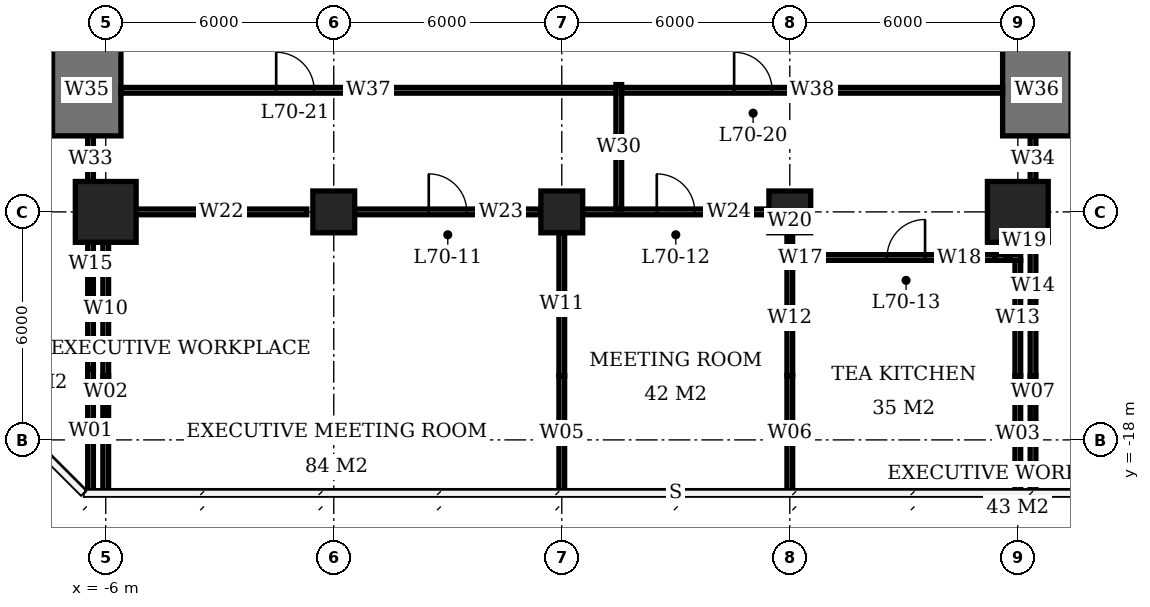
"""IFC4 building model, lengths in metres.
Left out: names, types, materials, properties, quantities, classifications, styles, units other than length and angle.
Written with IfcOpenShell. Run it as: python <this file> out.ifc"""

import sys

from ifc_helpers import new_model, si_unit, direction, frame, frame_2d, origin, origin_2d, place, context, subcontext, project, spatial, rectangle, extrude, element, fill, save


model = new_model("IFC4")
c1 = context("Model", 3, precision=1e-05, world=origin(), true_north=direction((0.0, 1.0)))
c2 = subcontext(c1, "Body", "Model", "MODEL_VIEW")
j1 = project(units=[si_unit("LENGTHUNIT", "METRE"), si_unit("PLANEANGLEUNIT", "RADIAN")], contexts=[c1])
p1 = place(None, origin())
s1 = spatial("IfcSite", under=j1, at=p1, CompositionType="ELEMENT")
p2 = place(p1, origin())
s2 = spatial("IfcBuilding", under=s1, at=p2, CompositionType="ELEMENT")
p3 = place(p2, frame((0.0, 0.0, 284.0)))
s3 = spatial("IfcBuildingStorey", under=s2, at=p3, CompositionType="ELEMENT", Elevation=284.0)
p4 = place(p3, frame((-6.0, -12.0, 0.0), z_axis=(0.0, 0.0, 1.0), x_axis=(1.0, 0.0, 0.0)))
e1 = element("IfcColumn", 1, at=p4, inside=s3, PredefinedType="COLUMN", context=c2, shape_type="SweptSolid", body=[
    extrude(rectangle(XDim=1.6, YDim=1.6, at=origin_2d()), origin(), (0.0, 0.0, 1.0), 3.9),
])
for number, where, z_axis, x_axis in (
    (2, (0.0, -12.0, 0.0), (0.0, 0.0, 1.0), (1.0, 0.0, 0.0)),
    (3, (6.0, -12.0, 0.0), (0.0, 0.0, 1.0), (1.0, 0.0, 0.0)),
    (4, (12.0, -12.0, 0.0), (0.0, 0.0, 1.0), (1.0, 0.0, 0.0)),
):
    element("IfcColumn", number, at=place(p3, frame(where, z_axis=z_axis, x_axis=x_axis)), inside=s3, PredefinedType="COLUMN", context=c2, shape_type="SweptSolid", body=[
        extrude(rectangle(XDim=1.1, YDim=1.1, at=origin_2d()), origin(), (0.0, 0.0, 1.0), 3.9),
    ])
p5 = place(p3, frame((18.0, -12.0, 0.0), z_axis=(0.0, 0.0, 1.0), x_axis=(1.0, 0.0, 0.0)))
e5 = element("IfcColumn", 5, at=p5, inside=s3, PredefinedType="COLUMN", context=c2, shape_type="SweptSolid", body=[
    extrude(rectangle(XDim=1.6, YDim=1.6, at=origin_2d()), origin(), (0.0, 0.0, 1.0), 3.9),
])
for number, where, z_axis, x_axis in (
    (6, (-6.5, -10.0, 0.0), (0.0, 0.0, 1.0), (0.0, 1.0, 0.0)),
    (7, (18.5, -10.0, 0.0), (0.0, 0.0, 1.0), (0.0, 1.0, 0.0)),
):
    element("IfcWall", number, at=place(p3, frame(where, z_axis=z_axis, x_axis=x_axis)), inside=s3, PredefinedType="SHEAR", context=c2, shape_type="SweptSolid", body=[
        extrude(rectangle(XDim=2.4, YDim=1.8, at=frame_2d((1.2, 0.0))), origin(), (0.0, 0.0, 1.0), 3.9),
    ])
p6 = place(p3, frame((11.85, -13.2, 0.0), z_axis=(0.0, 0.0, 1.0), x_axis=(1.0, 0.0, 0.0)))
e8 = element("IfcWall", 8, at=p6, inside=s3, PredefinedType="PARTITIONING", context=c2, shape_type="SweptSolid", body=[
    extrude(rectangle(XDim=0.86, YDim=0.15, at=frame_2d((0.43, 0.0))), origin(), (0.0, 0.0, 1.0), 2.65),
])
p7 = place(p3, frame((12.71, -13.2, 0.0), z_axis=(0.0, 0.0, 1.0), x_axis=(1.0, 0.0, 0.0)))
e9 = element("IfcWall", 9, at=p7, inside=s3, PredefinedType="PARTITIONING", context=c2, shape_type="SweptSolid", body=[
    extrude(rectangle(XDim=4.698, YDim=0.15, at=frame_2d((2.349, 0.0))), origin(), (0.0, 0.0, 1.0), 3.65),
])
p8 = place(p7, frame((1.849, 0.0, 0.0)))
e10 = element("IfcOpeningElement", 10, at=p8, cuts=e9, PredefinedType="OPENING", context=c2, shape_type="SweptSolid", body=[
    extrude(rectangle(XDim=1.0, YDim=2.4, at=frame_2d((0.5, 1.2))), frame((0.0, 0.085, 0.0), z_axis=(0.0, -1.0, 0.0), x_axis=(1.0, 0.0, 0.0)), (0.0, 0.0, 1.0), 0.17),
])
p9 = place(p3, frame((17.408, -13.2, 0.0), z_axis=(0.0, 0.0, 1.0), x_axis=(1.0, 0.0, 0.0)))
e11 = element("IfcWall", 11, at=p9, inside=s3, PredefinedType="PARTITIONING", context=c2, shape_type="SweptSolid", body=[
    extrude(rectangle(XDim=0.667, YDim=0.15, at=frame_2d((0.333, 0.0))), origin(), (0.0, 0.0, 1.0), 2.65),
])
p10 = place(p3, frame((-5.2, -12.0, 0.0), z_axis=(0.0, 0.0, 1.0), x_axis=(1.0, 0.0, 0.0)))
e12 = element("IfcWall", 12, at=p10, inside=s3, PredefinedType="PARTITIONING", context=c2, shape_type="SweptSolid", body=[
    extrude(rectangle(XDim=4.49, YDim=0.15, at=frame_2d((2.245, 0.0))), origin(), (0.0, 0.0, 1.0), 3.65),
])
p11 = place(p3, frame((0.56, -12.0, 0.0), z_axis=(0.0, 0.0, 1.0), x_axis=(1.0, 0.0, 0.0)))
e13 = element("IfcWall", 13, at=p11, inside=s3, PredefinedType="PARTITIONING", context=c2, shape_type="SweptSolid", body=[
    extrude(rectangle(XDim=4.88, YDim=0.15, at=frame_2d((2.44, 0.0))), origin(), (0.0, 0.0, 1.0), 3.65),
])
p12 = place(p11, frame((1.94, 0.0, 0.0)))
e14 = element("IfcOpeningElement", 14, at=p12, cuts=e13, PredefinedType="OPENING", context=c2, shape_type="SweptSolid", body=[
    extrude(rectangle(XDim=1.0, YDim=2.4, at=frame_2d((0.5, 1.2))), frame((0.0, 0.085, 0.0), z_axis=(0.0, -1.0, 0.0), x_axis=(1.0, 0.0, 0.0)), (0.0, 0.0, 1.0), 0.17),
])
p13 = place(p3, frame((6.56, -12.0, 0.0), z_axis=(0.0, 0.0, 1.0), x_axis=(1.0, 0.0, 0.0)))
e15 = element("IfcWall", 15, at=p13, inside=s3, PredefinedType="PARTITIONING", context=c2, shape_type="SweptSolid", body=[
    extrude(rectangle(XDim=4.88, YDim=0.15, at=frame_2d((2.44, 0.0))), origin(), (0.0, 0.0, 1.0), 3.65),
])
p14 = place(p13, frame((1.94, 0.0, 0.0)))
e16 = element("IfcOpeningElement", 16, at=p14, cuts=e15, PredefinedType="OPENING", context=c2, shape_type="SweptSolid", body=[
    extrude(rectangle(XDim=1.0, YDim=2.4, at=frame_2d((0.5, 1.2))), frame((0.0, 0.085, 0.0), z_axis=(0.0, -1.0, 0.0), x_axis=(1.0, 0.0, 0.0)), (0.0, 0.0, 1.0), 0.17),
])
p15 = place(p3, frame((-6.0, -19.375, 0.0), z_axis=(0.0, 0.0, 1.0), x_axis=(0.0, 1.0, 0.0)))
e17 = element("IfcWall", 17, at=p15, inside=s3, PredefinedType="PARTITIONING", context=c2, shape_type="SweptSolid", body=[
    extrude(rectangle(XDim=3.065, YDim=0.15, at=frame_2d((1.532, 0.0))), origin(), (0.0, 0.0, 1.0), 3.65),
])
p16 = place(p3, frame((-6.0, -16.31, 0.0), z_axis=(0.0, 0.0, 1.0), x_axis=(0.0, 1.0, 0.0)))
e18 = element("IfcWall", 18, at=p16, inside=s3, PredefinedType="PARTITIONING", context=c2, shape_type="SweptSolid", body=[
    extrude(rectangle(XDim=3.51, YDim=0.15, at=frame_2d((1.755, 0.0))), origin(), (0.0, 0.0, 1.0), 2.65),
])
p17 = place(p3, frame((6.0, -19.35, 0.0), z_axis=(0.0, 0.0, 1.0), x_axis=(0.0, 1.0, 0.0)))
e19 = element("IfcWall", 19, at=p17, inside=s3, PredefinedType="PARTITIONING", context=c2, shape_type="SweptSolid", body=[
    extrude(rectangle(XDim=3.04, YDim=0.15, at=frame_2d((1.52, 0.0))), origin(), (0.0, 0.0, 1.0), 3.65),
])
p18 = place(p3, frame((6.0, -16.31, 0.0), z_axis=(0.0, 0.0, 1.0), x_axis=(0.0, 1.0, 0.0)))
e20 = element("IfcWall", 20, at=p18, inside=s3, PredefinedType="PARTITIONING", context=c2, shape_type="SweptSolid", body=[
    extrude(rectangle(XDim=3.76, YDim=0.15, at=frame_2d((1.88, 0.0))), origin(), (0.0, 0.0, 1.0), 2.65),
])
p19 = place(p3, frame((12.0, -19.35, 0.0), z_axis=(0.0, 0.0, 1.0), x_axis=(0.0, 1.0, 0.0)))
e21 = element("IfcWall", 21, at=p19, inside=s3, PredefinedType="PARTITIONING", context=c2, shape_type="SweptSolid", body=[
    extrude(rectangle(XDim=3.04, YDim=0.15, at=frame_2d((1.52, 0.0))), origin(), (0.0, 0.0, 1.0), 3.65),
])
p20 = place(p3, frame((12.0, -16.31, 0.0), z_axis=(0.0, 0.0, 1.0), x_axis=(0.0, 1.0, 0.0)))
e22 = element("IfcWall", 22, at=p20, inside=s3, PredefinedType="PARTITIONING", context=c2, shape_type="SweptSolid", body=[
    extrude(rectangle(XDim=3.035, YDim=0.15, at=frame_2d((1.518, 0.0))), origin(), (0.0, 0.0, 1.0), 2.65),
])
p21 = place(p3, frame((12.0, -13.125, 0.0), z_axis=(0.0, 0.0, 1.0), x_axis=(0.0, 1.0, 0.0)))
e23 = element("IfcWall", 23, at=p21, inside=s3, PredefinedType="PARTITIONING", context=c2, shape_type="SweptSolid", body=[
    extrude(rectangle(XDim=0.575, YDim=0.15, at=frame_2d((0.288, 0.0))), origin(), (0.0, 0.0, 1.0), 2.65),
])
p22 = place(p3, frame((18.0, -19.375, 0.0), z_axis=(0.0, 0.0, 1.0), x_axis=(0.0, 1.0, 0.0)))
e24 = element("IfcWall", 24, at=p22, inside=s3, PredefinedType="PARTITIONING", context=c2, shape_type="SweptSolid", body=[
    extrude(rectangle(XDim=3.065, YDim=0.15, at=frame_2d((1.532, 0.0))), origin(), (0.0, 0.0, 1.0), 3.65),
])
p23 = place(p3, frame((18.0, -16.31, 0.0), z_axis=(0.0, 0.0, 1.0), x_axis=(0.0, 1.0, 0.0)))
e25 = element("IfcWall", 25, at=p23, inside=s3, PredefinedType="PARTITIONING", context=c2, shape_type="SweptSolid", body=[
    extrude(rectangle(XDim=3.035, YDim=0.15, at=frame_2d((1.518, 0.0))), origin(), (0.0, 0.0, 1.0), 2.65),
])
p24 = place(p3, frame((-6.4, -19.375, 0.0), z_axis=(0.0, 0.0, 1.0), x_axis=(0.0, 1.0, 0.0)))
e26 = element("IfcWall", 26, at=p24, inside=s3, PredefinedType="PARTITIONING", context=c2, shape_type="SweptSolid", body=[
    extrude(rectangle(XDim=3.235, YDim=0.15, at=frame_2d((1.618, 0.0))), origin(), (0.0, 0.0, 1.0), 3.65),
])
p25 = place(p3, frame((-6.4, -16.14, 0.0), z_axis=(0.0, 0.0, 1.0), x_axis=(0.0, 1.0, 0.0)))
e27 = element("IfcWall", 27, at=p25, inside=s3, PredefinedType="PARTITIONING", context=c2, shape_type="SweptSolid", body=[
    extrude(rectangle(XDim=3.34, YDim=0.15, at=frame_2d((1.67, 0.0))), origin(), (0.0, 0.0, 1.0), 2.65),
])
p26 = place(p3, frame((-6.4, -11.2, 0.0), z_axis=(0.0, 0.0, 1.0), x_axis=(0.0, 1.0, 0.0)))
e28 = element("IfcWall", 28, at=p26, inside=s3, PredefinedType="PARTITIONING", context=c2, shape_type="SweptSolid", body=[
    extrude(rectangle(XDim=1.2, YDim=0.15, at=frame_2d((0.6, 0.0))), origin(), (0.0, 0.0, 1.0), 3.65),
])
p27 = place(p3, frame((-5.6, -8.8, 0.0), z_axis=(0.0, 0.0, 1.0), x_axis=(1.0, 0.0, 0.0)))
e29 = element("IfcWall", 29, at=p27, inside=s3, PredefinedType="PARTITIONING", context=c2, shape_type="SweptSolid", body=[
    extrude(rectangle(XDim=13.025, YDim=0.15, at=frame_2d((6.513, 0.0))), origin(), (0.0, 0.0, 1.0), 3.65),
])
p28 = place(p27, frame((4.085, 0.0, 0.0)))
e30 = element("IfcOpeningElement", 30, at=p28, cuts=e29, PredefinedType="OPENING", context=c2, shape_type="SweptSolid", body=[
    extrude(rectangle(XDim=1.0, YDim=2.4, at=frame_2d((0.5, 1.2))), frame((0.0, 0.085, 0.0), z_axis=(0.0, -1.0, 0.0), x_axis=(1.0, 0.0, 0.0)), (0.0, 0.0, 1.0), 0.17),
])
p29 = place(p3, frame((7.5, -11.925, 0.0), z_axis=(0.0, 0.0, 1.0), x_axis=(0.0, 1.0, 0.0)))
e31 = element("IfcWall", 31, at=p29, inside=s3, PredefinedType="PARTITIONING", context=c2, shape_type="SweptSolid", body=[
    extrude(rectangle(XDim=3.275, YDim=0.15, at=frame_2d((1.638, 0.0))), origin(), (0.0, 0.0, 1.0), 3.65),
])
p30 = place(p3, frame((7.575, -8.8, 0.0), z_axis=(0.0, 0.0, 1.0), x_axis=(1.0, 0.0, 0.0)))
e32 = element("IfcWall", 32, at=p30, inside=s3, PredefinedType="PARTITIONING", context=c2, shape_type="SweptSolid", body=[
    extrude(rectangle(XDim=10.025, YDim=0.15, at=frame_2d((5.013, 0.0))), origin(), (0.0, 0.0, 1.0), 3.65),
])
p31 = place(p30, frame((2.96, 0.0, 0.0)))
e33 = element("IfcOpeningElement", 33, at=p31, cuts=e32, PredefinedType="OPENING", context=c2, shape_type="SweptSolid", body=[
    extrude(rectangle(XDim=1.0, YDim=2.4, at=frame_2d((0.5, 1.2))), frame((0.0, 0.085, 0.0), z_axis=(0.0, -1.0, 0.0), x_axis=(1.0, 0.0, 0.0)), (0.0, 0.0, 1.0), 0.17),
])
p32 = place(p3, frame((18.4, -19.35, 0.0), z_axis=(0.0, 0.0, 1.0), x_axis=(0.0, 1.0, 0.0)))
e34 = element("IfcWall", 34, at=p32, inside=s3, PredefinedType="PARTITIONING", context=c2, shape_type="SweptSolid", body=[
    extrude(rectangle(XDim=3.04, YDim=0.15, at=frame_2d((1.52, 0.0))), origin(), (0.0, 0.0, 1.0), 3.65),
])
p33 = place(p3, frame((18.4, -16.31, 0.0), z_axis=(0.0, 0.0, 1.0), x_axis=(0.0, 1.0, 0.0)))
e35 = element("IfcWall", 35, at=p33, inside=s3, PredefinedType="PARTITIONING", context=c2, shape_type="SweptSolid", body=[
    extrude(rectangle(XDim=3.51, YDim=0.15, at=frame_2d((1.755, 0.0))), origin(), (0.0, 0.0, 1.0), 2.65),
])
p34 = place(p3, frame((18.4, -11.2, 0.0), z_axis=(0.0, 0.0, 1.0), x_axis=(0.0, 1.0, 0.0)))
e36 = element("IfcWall", 36, at=p34, inside=s3, PredefinedType="PARTITIONING", context=c2, shape_type="SweptSolid", body=[
    extrude(rectangle(XDim=1.2, YDim=0.15, at=frame_2d((0.6, 0.0))), origin(), (0.0, 0.0, 1.0), 3.65),
])
p35 = place(p12, origin())
e37 = element("IfcDoor", 37, at=p35, inside=s3, OperationType="SINGLE_SWING_LEFT", PredefinedType="DOOR", context=c2, shape_type="SweptSolid", body=[
    extrude(rectangle(XDim=1.0, YDim=2.4, at=frame_2d((0.5, 1.2))), frame((0.0, 0.025, 0.0), z_axis=(0.0, -1.0, 0.0), x_axis=(1.0, 0.0, 0.0)), (0.0, 0.0, 1.0), 0.05),
])
fill(e14, e37)
p36 = place(p14, origin())
e38 = element("IfcDoor", 38, at=p36, inside=s3, OperationType="SINGLE_SWING_LEFT", PredefinedType="DOOR", context=c2, shape_type="SweptSolid", body=[
    extrude(rectangle(XDim=1.0, YDim=2.4, at=frame_2d((0.5, 1.2))), frame((0.0, 0.025, 0.0), z_axis=(0.0, -1.0, 0.0), x_axis=(1.0, 0.0, 0.0)), (0.0, 0.0, 1.0), 0.05),
])
fill(e16, e38)
p37 = place(p8, origin())
e39 = element("IfcDoor", 39, at=p37, inside=s3, OperationType="SINGLE_SWING_RIGHT", PredefinedType="DOOR", context=c2, shape_type="SweptSolid", body=[
    extrude(rectangle(XDim=1.0, YDim=2.4, at=frame_2d((0.5, 1.2))), frame((0.0, 0.025, 0.0), z_axis=(0.0, -1.0, 0.0), x_axis=(1.0, 0.0, 0.0)), (0.0, 0.0, 1.0), 0.05),
])
fill(e10, e39)
p38 = place(p31, origin())
e40 = element("IfcDoor", 40, at=p38, inside=s3, OperationType="SINGLE_SWING_LEFT", PredefinedType="DOOR", context=c2, shape_type="SweptSolid", body=[
    extrude(rectangle(XDim=1.0, YDim=2.4, at=frame_2d((0.5, 1.2))), frame((0.0, 0.025, 0.0), z_axis=(0.0, -1.0, 0.0), x_axis=(1.0, 0.0, 0.0)), (0.0, 0.0, 1.0), 0.05),
])
fill(e33, e40)
p39 = place(p28, origin())
e41 = element("IfcDoor", 41, at=p39, inside=s3, OperationType="SINGLE_SWING_LEFT", PredefinedType="DOOR", context=c2, shape_type="SweptSolid", body=[
    extrude(rectangle(XDim=1.0, YDim=2.4, at=frame_2d((0.5, 1.2))), frame((0.0, 0.025, 0.0), z_axis=(0.0, -1.0, 0.0), x_axis=(1.0, 0.0, 0.0)), (0.0, 0.0, 1.0), 0.05),
])
fill(e30, e41)
save(model, sys.argv[1])
